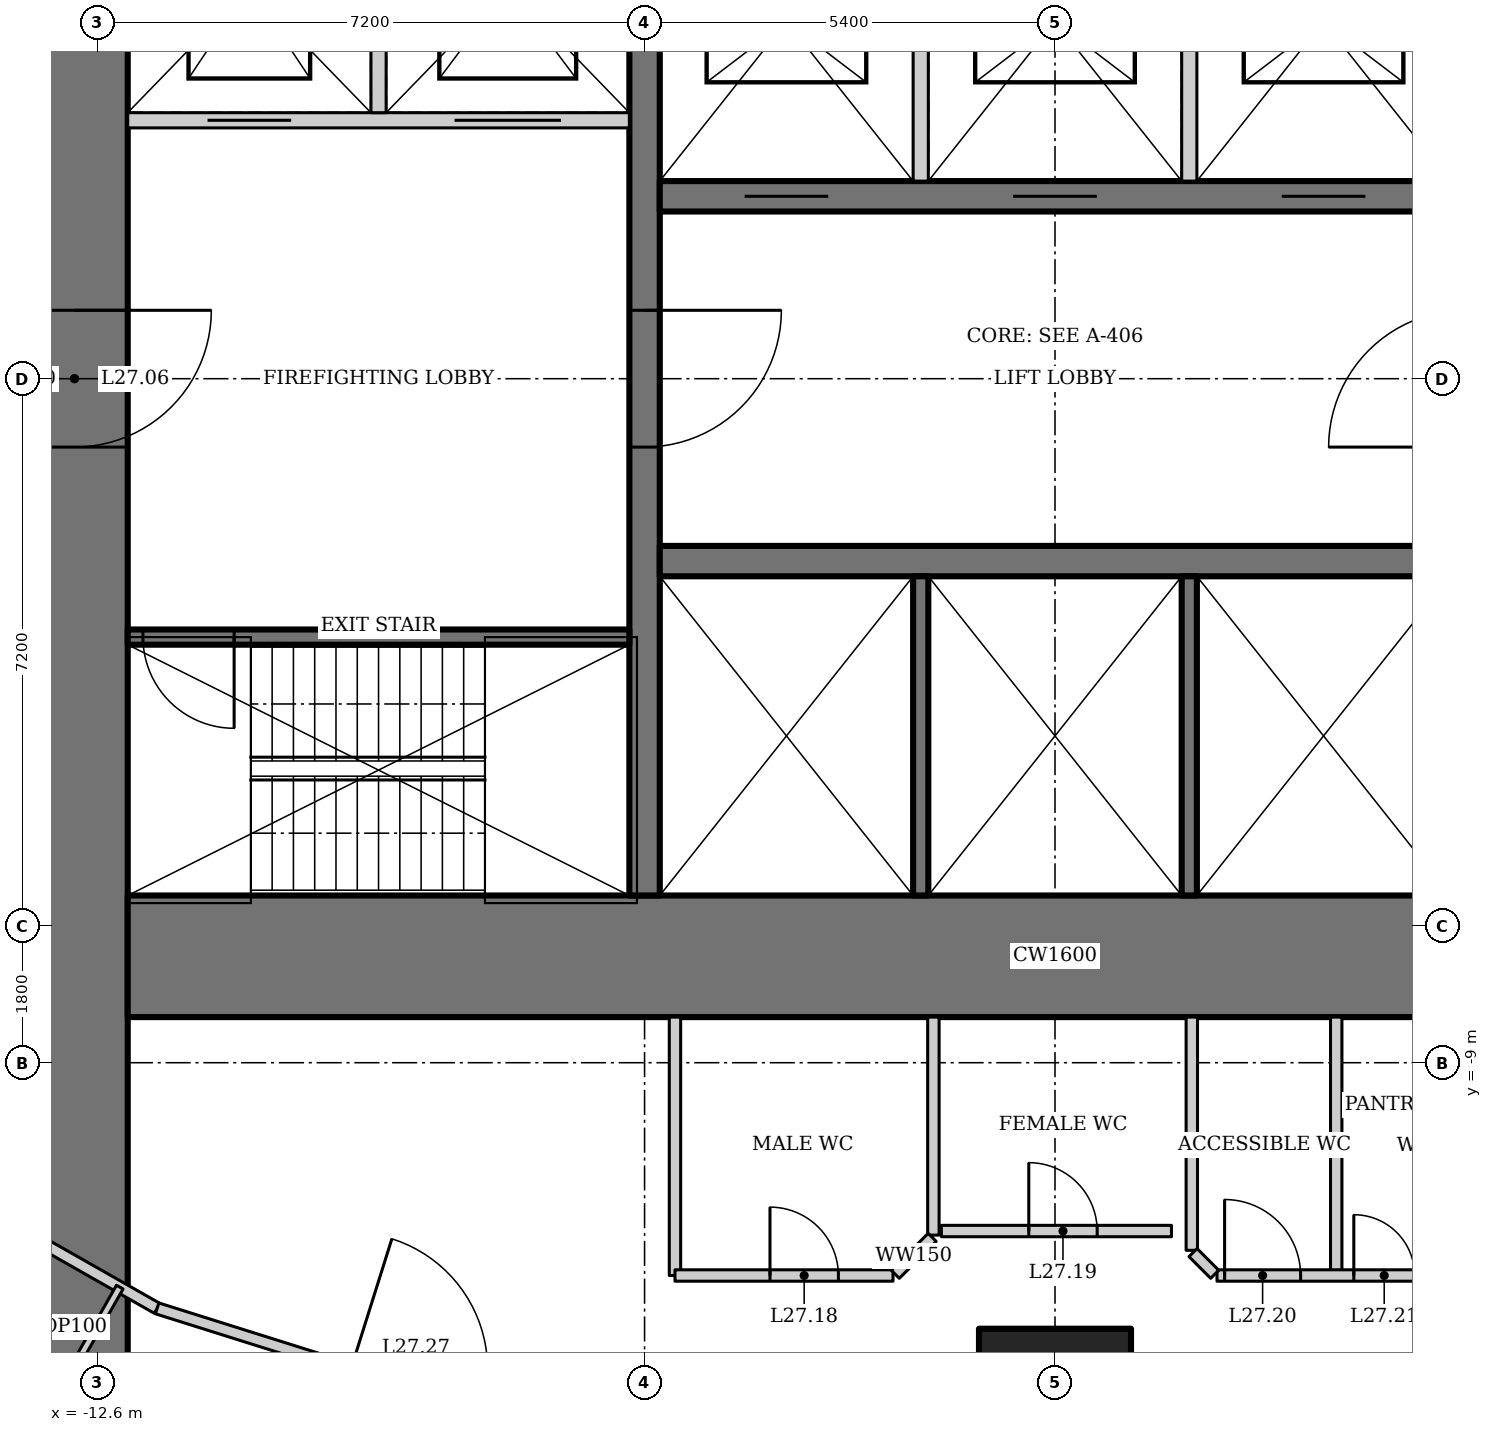
"""IFC4 building model, lengths in metres.
Left out: names, types, materials, properties, quantities, classifications, styles, units other than length and angle.
Written with IfcOpenShell. Run it as: python <this file> out.ifc"""

import sys

from ifc_helpers import new_model, si_unit, direction, frame, frame_2d, origin, origin_2d, place, context, subcontext, project, spatial, rectangle, hollow_rectangle, extrude, element, fill, save


model = new_model("IFC4")
c1 = context("Model", 3, precision=1e-05, world=origin(), true_north=direction((0.0, 1.0)))
c2 = subcontext(c1, "Body", "Model", "MODEL_VIEW")
j1 = project(units=[si_unit("LENGTHUNIT", "METRE"), si_unit("PLANEANGLEUNIT", "RADIAN")], contexts=[c1])
p1 = place(None, origin())
s1 = spatial("IfcSite", under=j1, at=p1, CompositionType="ELEMENT")
p2 = place(p1, origin())
s2 = spatial("IfcBuilding", under=s1, at=p2, CompositionType="ELEMENT")
p3 = place(p2, frame((0.0, 0.0, 117.4)))
s3 = spatial("IfcBuildingStorey", under=s2, at=p3, CompositionType="ELEMENT", Elevation=117.4)
p4 = place(p3, frame((0.0, -13.5, 0.0), z_axis=(0.0, 0.0, 1.0), x_axis=(1.0, 0.0, 0.0)))
e1 = element("IfcColumn", 1, at=p4, inside=s3, PredefinedType="COLUMN", context=c2, shape_type="SweptSolid", body=[
    extrude(hollow_rectangle(XDim=2.0, YDim=2.0, WallThickness=0.17, at=origin_2d()), origin(), (0.0, 0.0, 1.0), 4.2),
])
p5 = place(p3, frame((-12.9, 13.0, 0.0), z_axis=(0.0, 0.0, 1.0), x_axis=(0.0, -1.0, 0.0)))
e2 = element("IfcWall", 2, at=p5, inside=s3, PredefinedType="SHEAR", context=c2, shape_type="SweptSolid", body=[
    extrude(rectangle(XDim=26.0, YDim=1.4, at=frame_2d((13.0, 0.0))), origin(), (0.0, 0.0, 1.0), 4.2),
])
p6 = place(p5, frame((12.1, 0.0, 0.0)))
e3 = element("IfcOpeningElement", 3, at=p6, cuts=e2, PredefinedType="OPENING", context=c2, shape_type="SweptSolid", body=[
    extrude(rectangle(XDim=1.8, YDim=2.1, at=frame_2d((0.9, 1.05))), frame((0.0, 0.71, 0.0), z_axis=(0.0, -1.0, 0.0), x_axis=(1.0, 0.0, 0.0)), (0.0, 0.0, 1.0), 1.42),
])
p7 = place(p3, frame((-12.2, -7.6, 0.0), z_axis=(0.0, 0.0, 1.0), x_axis=(1.0, 0.0, 0.0)))
e4 = element("IfcWall", 4, at=p7, inside=s3, PredefinedType="SHEAR", context=c2, shape_type="SweptSolid", body=[
    extrude(rectangle(XDim=24.4, YDim=1.6, at=frame_2d((12.2, 0.0))), origin(), (0.0, 0.0, 1.0), 4.2),
])
p8 = place(p3, frame((-5.4, 6.8, 0.0), z_axis=(0.0, 0.0, 1.0), x_axis=(0.0, -1.0, 0.0)))
e5 = element("IfcWall", 5, at=p8, inside=s3, PredefinedType="SHEAR", context=c2, shape_type="SweptSolid", body=[
    extrude(rectangle(XDim=13.6, YDim=0.4, at=frame_2d((6.8, 0.0))), origin(), (0.0, 0.0, 1.0), 4.2),
])
p9 = place(p8, frame((5.9, 0.0, 0.0)))
e6 = element("IfcOpeningElement", 6, at=p9, cuts=e5, PredefinedType="OPENING", context=c2, shape_type="SweptSolid", body=[
    extrude(rectangle(XDim=1.8, YDim=2.1, at=frame_2d((0.9, 1.05))), frame((0.0, 0.21, 0.0), z_axis=(0.0, -1.0, 0.0), x_axis=(1.0, 0.0, 0.0)), (0.0, 0.0, 1.0), 0.42),
])
p10 = place(p3, frame((-5.2, -2.4, 0.0), z_axis=(0.0, 0.0, 1.0), x_axis=(1.0, 0.0, 0.0)))
e7 = element("IfcWall", 7, at=p10, inside=s3, PredefinedType="SHEAR", context=c2, shape_type="SweptSolid", body=[
    extrude(rectangle(XDim=10.4, YDim=0.4, at=frame_2d((5.2, 0.0))), origin(), (0.0, 0.0, 1.0), 4.2),
])
for number, where, z_axis, x_axis in (
    (8, (-1.767, -2.6, 0.0), (0.0, 0.0, 1.0), (0.0, -1.0, 0.0)),
    (9, (1.767, -2.6, 0.0), (0.0, 0.0, 1.0), (0.0, -1.0, 0.0)),
):
    element("IfcWall", number, at=place(p3, frame(where, z_axis=z_axis, x_axis=x_axis)), inside=s3, PredefinedType="SOLIDWALL", context=c2, shape_type="SweptSolid", body=[
        extrude(rectangle(XDim=4.2, YDim=0.2, at=frame_2d((2.1, 0.0))), origin(), (0.0, 0.0, 1.0), 4.2),
    ])
p11 = place(p3, frame((5.2, 2.4, 0.0), z_axis=(0.0, 0.0, 1.0), x_axis=(-1.0, 0.0, 0.0)))
e10 = element("IfcWall", 10, at=p11, inside=s3, PredefinedType="SHEAR", context=c2, shape_type="SweptSolid", body=[
    extrude(rectangle(XDim=10.4, YDim=0.4, at=frame_2d((5.2, 0.0))), origin(), (0.0, 0.0, 1.0), 4.2),
])
p12 = place(p11, frame((8.183, 0.0, 0.0)))
e11 = element("IfcOpeningElement", 11, at=p12, cuts=e10, PredefinedType="OPENING", context=c2, shape_type="SweptSolid", body=[
    extrude(rectangle(XDim=1.1, YDim=2.2, at=frame_2d((0.55, 1.1))), frame((0.0, 0.21, 0.0), z_axis=(0.0, -1.0, 0.0), x_axis=(1.0, 0.0, 0.0)), (0.0, 0.0, 1.0), 0.42),
])
p13 = place(p11, frame((4.65, 0.0, 0.0)))
e12 = element("IfcOpeningElement", 12, at=p13, cuts=e10, PredefinedType="OPENING", context=c2, shape_type="SweptSolid", body=[
    extrude(rectangle(XDim=1.1, YDim=2.2, at=frame_2d((0.55, 1.1))), frame((0.0, 0.21, 0.0), z_axis=(0.0, -1.0, 0.0), x_axis=(1.0, 0.0, 0.0)), (0.0, 0.0, 1.0), 0.42),
])
p14 = place(p11, frame((1.117, 0.0, 0.0)))
e13 = element("IfcOpeningElement", 13, at=p14, cuts=e10, PredefinedType="OPENING", context=c2, shape_type="SweptSolid", body=[
    extrude(rectangle(XDim=1.1, YDim=2.2, at=frame_2d((0.55, 1.1))), frame((0.0, 0.21, 0.0), z_axis=(0.0, -1.0, 0.0), x_axis=(1.0, 0.0, 0.0)), (0.0, 0.0, 1.0), 0.42),
])
for number, where, z_axis, x_axis in (
    (14, (-1.767, 2.6, 0.0), (0.0, 0.0, 1.0), (0.0, 1.0, 0.0)),
    (15, (1.767, 2.6, 0.0), (0.0, 0.0, 1.0), (0.0, 1.0, 0.0)),
):
    element("IfcWall", number, at=place(p3, frame(where, z_axis=z_axis, x_axis=x_axis)), inside=s3, PredefinedType="SOLIDWALL", context=c2, shape_type="SweptSolid", body=[
        extrude(rectangle(XDim=4.2, YDim=0.2, at=frame_2d((2.1, 0.0))), origin(), (0.0, 0.0, 1.0), 4.2),
    ])
p15 = place(p3, frame((-5.6, -3.4, 0.0), z_axis=(0.0, 0.0, 1.0), x_axis=(-1.0, 0.0, 0.0)))
e16 = element("IfcWall", 16, at=p15, inside=s3, PredefinedType="SHEAR", context=c2, shape_type="SweptSolid", body=[
    extrude(rectangle(XDim=6.6, YDim=0.2, at=frame_2d((3.3, 0.0))), origin(), (0.0, 0.0, 1.0), 4.2),
])
p16 = place(p15, frame((5.2, 0.0, 0.0)))
e17 = element("IfcOpeningElement", 17, at=p16, cuts=e16, PredefinedType="OPENING", context=c2, shape_type="SweptSolid", body=[
    extrude(rectangle(XDim=1.2, YDim=2.1, at=frame_2d((0.6, 1.05))), frame((0.0, 0.11, 0.0), z_axis=(0.0, -1.0, 0.0), x_axis=(1.0, 0.0, 0.0)), (0.0, 0.0, 1.0), 0.22),
])
p17 = place(p3, frame((-12.2, 3.4, 0.0), z_axis=(0.0, 0.0, 1.0), x_axis=(1.0, 0.0, 0.0)))
e18 = element("IfcWall", 18, at=p17, inside=s3, PredefinedType="SOLIDWALL", context=c2, shape_type="SweptSolid", body=[
    extrude(rectangle(XDim=6.6, YDim=0.2, at=frame_2d((3.3, 0.0))), origin(), (0.0, 0.0, 1.0), 4.2),
])
p18 = place(p17, frame((1.05, 0.0, 0.0)))
e19 = element("IfcOpeningElement", 19, at=p18, cuts=e18, PredefinedType="OPENING", context=c2, shape_type="SweptSolid", body=[
    extrude(rectangle(XDim=1.1, YDim=2.2, at=frame_2d((0.55, 1.1))), frame((0.0, 0.11, 0.0), z_axis=(0.0, -1.0, 0.0), x_axis=(1.0, 0.0, 0.0)), (0.0, 0.0, 1.0), 0.22),
])
p19 = place(p17, frame((4.3, 0.0, 0.0)))
e20 = element("IfcOpeningElement", 20, at=p19, cuts=e18, PredefinedType="OPENING", context=c2, shape_type="SweptSolid", body=[
    extrude(rectangle(XDim=1.4, YDim=2.2, at=frame_2d((0.7, 1.1))), frame((0.0, 0.11, 0.0), z_axis=(0.0, -1.0, 0.0), x_axis=(1.0, 0.0, 0.0)), (0.0, 0.0, 1.0), 0.22),
])
p20 = place(p3, frame((-8.9, 3.5, 0.0), z_axis=(0.0, 0.0, 1.0), x_axis=(0.0, 1.0, 0.0)))
e21 = element("IfcWall", 21, at=p20, inside=s3, PredefinedType="SOLIDWALL", context=c2, shape_type="SweptSolid", body=[
    extrude(rectangle(XDim=3.3, YDim=0.2, at=frame_2d((1.65, 0.0))), origin(), (0.0, 0.0, 1.0), 4.2),
])
p21 = place(p3, frame((-16.623, -9.499, 0.0), z_axis=(0.0, 0.0, 1.0), x_axis=(0.869375991036, -0.494151177485, 0.0)))
e22 = element("IfcWall", 22, at=p21, inside=s3, PredefinedType="PARTITIONING", context=c2, shape_type="SweptSolid", body=[
    extrude(rectangle(XDim=5.532, YDim=0.15, at=frame_2d((2.766, 0.0))), origin(), (0.0, 0.0, 1.0), 4.05),
])
p22 = place(p3, frame((-11.813, -12.232, 0.0), z_axis=(0.0, 0.0, 1.0), x_axis=(0.953893934057, -0.300143903101, 0.0)))
e23 = element("IfcWall", 23, at=p22, inside=s3, PredefinedType="PARTITIONING", context=c2, shape_type="SweptSolid", body=[
    extrude(rectangle(XDim=5.042, YDim=0.15, at=frame_2d((2.521, 0.0))), origin(), (0.0, 0.0, 1.0), 4.05),
])
p23 = place(p22, frame((2.671, 0.0, 0.0)))
e24 = element("IfcOpeningElement", 24, at=p23, cuts=e23, PredefinedType="OPENING", context=c2, shape_type="SweptSolid", body=[
    extrude(rectangle(XDim=1.8, YDim=2.1, at=frame_2d((0.9, 1.05))), frame((0.0, 0.085, 0.0), z_axis=(0.0, -1.0, 0.0), x_axis=(1.0, 0.0, 0.0)), (0.0, 0.0, 1.0), 0.17),
])
for number, where, z_axis, x_axis in (
    (25, (-5.0, -8.4, 0.0), (0.0, 0.0, 1.0), (0.0, -1.0, 0.0)),
    (26, (3.7, -8.4, 0.0), (0.0, 0.0, 1.0), (0.0, -1.0, 0.0)),
):
    element("IfcWall", number, at=place(p3, frame(where, z_axis=z_axis, x_axis=x_axis)), inside=s3, PredefinedType="SOLIDWALL", context=c2, shape_type="SweptSolid", body=[
        extrude(rectangle(XDim=3.4, YDim=0.15, at=frame_2d((1.7, 0.0))), origin(), (0.0, 0.0, 1.0), 4.05),
    ])
p24 = place(p3, frame((-12.9, -13.0, 0.0), z_axis=(0.0, 0.0, 1.0), x_axis=(0.494173075358, 0.869363543974, 0.0)))
e27 = element("IfcWall", 27, at=p24, inside=s3, PredefinedType="PARTITIONING", context=c2, shape_type="SweptSolid", body=[
    extrude(rectangle(XDim=1.204, YDim=0.1, at=frame_2d((0.602, 0.0))), origin(), (0.0, 0.0, 1.0), 4.05),
])
p25 = place(p3, frame((-5.0, -11.8, 0.0), z_axis=(0.0, 0.0, 1.0), x_axis=(1.0, 0.0, 0.0)))
e28 = element("IfcWall", 28, at=p25, inside=s3, PredefinedType="SOLIDWALL", context=c2, shape_type="SweptSolid", body=[
    extrude(rectangle(XDim=2.869, YDim=0.15, at=frame_2d((1.434, 0.0))), origin(), (0.0, 0.0, 1.0), 4.05),
])
p26 = place(p25, frame((1.25, 0.0, 0.0)))
e29 = element("IfcOpeningElement", 29, at=p26, cuts=e28, PredefinedType="OPENING", context=c2, shape_type="SweptSolid", body=[
    extrude(rectangle(XDim=0.9, YDim=2.1, at=frame_2d((0.45, 1.05))), frame((0.0, 0.085, 0.0), z_axis=(0.0, -1.0, 0.0), x_axis=(1.0, 0.0, 0.0)), (0.0, 0.0, 1.0), 0.17),
])
p27 = place(p3, frame((2.131, -11.8, 0.0), z_axis=(0.0, 0.0, 1.0), x_axis=(1.0, 0.0, 0.0)))
e30 = element("IfcWall", 30, at=p27, inside=s3, PredefinedType="SOLIDWALL", context=c2, shape_type="SweptSolid", body=[
    extrude(rectangle(XDim=2.869, YDim=0.15, at=frame_2d((1.434, 0.0))), origin(), (0.0, 0.0, 1.0), 4.05),
])
p28 = place(p27, frame((0.1, 0.0, 0.0)))
e31 = element("IfcOpeningElement", 31, at=p28, cuts=e30, PredefinedType="OPENING", context=c2, shape_type="SweptSolid", body=[
    extrude(rectangle(XDim=1.0, YDim=2.1, at=frame_2d((0.5, 1.05))), frame((0.0, 0.085, 0.0), z_axis=(0.0, -1.0, 0.0), x_axis=(1.0, 0.0, 0.0)), (0.0, 0.0, 1.0), 0.17),
])
p29 = place(p27, frame((1.8, 0.0, 0.0)))
e32 = element("IfcOpeningElement", 32, at=p29, cuts=e30, PredefinedType="OPENING", context=c2, shape_type="SweptSolid", body=[
    extrude(rectangle(XDim=0.8, YDim=2.1, at=frame_2d((0.4, 1.05))), frame((0.0, 0.085, 0.0), z_axis=(0.0, -1.0, 0.0), x_axis=(1.0, 0.0, 0.0)), (0.0, 0.0, 1.0), 0.17),
])
p30 = place(p3, frame((-1.6, -8.4, 0.0), z_axis=(0.0, 0.0, 1.0), x_axis=(0.0, -1.0, 0.0)))
e33 = element("IfcWall", 33, at=p30, inside=s3, PredefinedType="SOLIDWALL", context=c2, shape_type="SweptSolid", body=[
    extrude(rectangle(XDim=2.869, YDim=0.15, at=frame_2d((1.434, 0.0))), origin(), (0.0, 0.0, 1.0), 4.05),
])
p31 = place(p3, frame((1.8, -8.4, 0.0), z_axis=(0.0, 0.0, 1.0), x_axis=(0.0, -1.0, 0.0)))
e34 = element("IfcWall", 34, at=p31, inside=s3, PredefinedType="SOLIDWALL", context=c2, shape_type="SweptSolid", body=[
    extrude(rectangle(XDim=3.069, YDim=0.15, at=frame_2d((1.534, 0.0))), origin(), (0.0, 0.0, 1.0), 4.05),
])
p32 = place(p3, frame((-2.101, -11.784, 0.0), z_axis=(0.0, 0.0, 1.0), x_axis=(0.706928959799, 0.707284557867, 0.0)))
e35 = element("IfcWall", 35, at=p32, inside=s3, PredefinedType="SOLIDWALL", context=c2, shape_type="SweptSolid", body=[
    extrude(rectangle(XDim=0.687, YDim=0.15, at=frame_2d((0.343, 0.0))), origin(), (0.0, 0.0, 1.0), 4.05),
])
p33 = place(p3, frame((-1.495, -11.215, 0.0), z_axis=(0.0, 0.0, 1.0), x_axis=(1.0, 0.0, 0.0)))
e36 = element("IfcWall", 36, at=p33, inside=s3, PredefinedType="SOLIDWALL", context=c2, shape_type="SweptSolid", body=[
    extrude(rectangle(XDim=3.027, YDim=0.15, at=frame_2d((1.514, 0.0))), origin(), (0.0, 0.0, 1.0), 4.05),
])
p34 = place(p33, frame((1.15, 0.0, 0.0)))
e37 = element("IfcOpeningElement", 37, at=p34, cuts=e36, PredefinedType="OPENING", context=c2, shape_type="SweptSolid", body=[
    extrude(rectangle(XDim=0.9, YDim=2.1, at=frame_2d((0.45, 1.05))), frame((0.0, 0.085, 0.0), z_axis=(0.0, -1.0, 0.0), x_axis=(1.0, 0.0, 0.0)), (0.0, 0.0, 1.0), 0.17),
])
p35 = place(p3, frame((1.816, -11.499, 0.0), z_axis=(0.0, 0.0, 1.0), x_axis=(0.706804405012, -0.707409028113, 0.0)))
e38 = element("IfcWall", 38, at=p35, inside=s3, PredefinedType="SOLIDWALL", context=c2, shape_type="SweptSolid", body=[
    extrude(rectangle(XDim=0.404, YDim=0.15, at=frame_2d((0.202, 0.0))), origin(), (0.0, 0.0, 1.0), 4.05),
])
p36 = place(p9, origin())
e39 = element("IfcDoor", 39, at=p36, inside=s3, OperationType="DOUBLE_DOOR_DOUBLE_SWING", PredefinedType="DOOR", context=c2, shape_type="SweptSolid", body=[
    extrude(rectangle(XDim=1.8, YDim=2.1, at=frame_2d((0.9, 1.05))), frame((0.0, 0.025, 0.0), z_axis=(0.0, -1.0, 0.0), x_axis=(1.0, 0.0, 0.0)), (0.0, 0.0, 1.0), 0.05),
])
fill(e6, e39)
p37 = place(p16, origin())
e40 = element("IfcDoor", 40, at=p37, inside=s3, OperationType="SINGLE_SWING_RIGHT", PredefinedType="DOOR", context=c2, shape_type="SweptSolid", body=[
    extrude(rectangle(XDim=1.2, YDim=2.1, at=frame_2d((0.6, 1.05))), frame((0.0, 0.025, 0.0), z_axis=(0.0, -1.0, 0.0), x_axis=(1.0, 0.0, 0.0)), (0.0, 0.0, 1.0), 0.05),
])
fill(e17, e40)
p38 = place(p6, origin())
e41 = element("IfcDoor", 41, at=p38, inside=s3, OperationType="DOUBLE_DOOR_DOUBLE_SWING", PredefinedType="DOOR", context=c2, shape_type="SweptSolid", body=[
    extrude(rectangle(XDim=1.8, YDim=2.1, at=frame_2d((0.9, 1.05))), frame((0.0, 0.025, 0.0), z_axis=(0.0, -1.0, 0.0), x_axis=(1.0, 0.0, 0.0)), (0.0, 0.0, 1.0), 0.05),
])
fill(e3, e41)
p39 = place(p12, origin())
e42 = element("IfcDoor", 42, at=p39, inside=s3, OperationType="DOUBLE_DOOR_SLIDING", PredefinedType="DOOR", context=c2, shape_type="SweptSolid", body=[
    extrude(rectangle(XDim=1.1, YDim=2.2, at=frame_2d((0.55, 1.1))), frame((0.0, 0.025, 0.0), z_axis=(0.0, -1.0, 0.0), x_axis=(1.0, 0.0, 0.0)), (0.0, 0.0, 1.0), 0.05),
])
fill(e11, e42)
p40 = place(p13, origin())
e43 = element("IfcDoor", 43, at=p40, inside=s3, OperationType="DOUBLE_DOOR_SLIDING", PredefinedType="DOOR", context=c2, shape_type="SweptSolid", body=[
    extrude(rectangle(XDim=1.1, YDim=2.2, at=frame_2d((0.55, 1.1))), frame((0.0, 0.025, 0.0), z_axis=(0.0, -1.0, 0.0), x_axis=(1.0, 0.0, 0.0)), (0.0, 0.0, 1.0), 0.05),
])
fill(e12, e43)
p41 = place(p14, origin())
e44 = element("IfcDoor", 44, at=p41, inside=s3, OperationType="DOUBLE_DOOR_SLIDING", PredefinedType="DOOR", context=c2, shape_type="SweptSolid", body=[
    extrude(rectangle(XDim=1.1, YDim=2.2, at=frame_2d((0.55, 1.1))), frame((0.0, 0.025, 0.0), z_axis=(0.0, -1.0, 0.0), x_axis=(1.0, 0.0, 0.0)), (0.0, 0.0, 1.0), 0.05),
])
fill(e13, e44)
p42 = place(p18, origin())
e45 = element("IfcDoor", 45, at=p42, inside=s3, OperationType="DOUBLE_DOOR_SLIDING", PredefinedType="DOOR", context=c2, shape_type="SweptSolid", body=[
    extrude(rectangle(XDim=1.1, YDim=2.2, at=frame_2d((0.55, 1.1))), frame((0.0, 0.025, 0.0), z_axis=(0.0, -1.0, 0.0), x_axis=(1.0, 0.0, 0.0)), (0.0, 0.0, 1.0), 0.05),
])
fill(e19, e45)
p43 = place(p19, origin())
e46 = element("IfcDoor", 46, at=p43, inside=s3, OperationType="DOUBLE_DOOR_SLIDING", PredefinedType="DOOR", context=c2, shape_type="SweptSolid", body=[
    extrude(rectangle(XDim=1.4, YDim=2.2, at=frame_2d((0.7, 1.1))), frame((0.0, 0.025, 0.0), z_axis=(0.0, -1.0, 0.0), x_axis=(1.0, 0.0, 0.0)), (0.0, 0.0, 1.0), 0.05),
])
fill(e20, e46)
p44 = place(p26, origin())
e47 = element("IfcDoor", 47, at=p44, inside=s3, OperationType="SINGLE_SWING_LEFT", PredefinedType="DOOR", context=c2, shape_type="SweptSolid", body=[
    extrude(rectangle(XDim=0.9, YDim=2.1, at=frame_2d((0.45, 1.05))), frame((0.0, 0.025, 0.0), z_axis=(0.0, -1.0, 0.0), x_axis=(1.0, 0.0, 0.0)), (0.0, 0.0, 1.0), 0.05),
])
fill(e29, e47)
p45 = place(p34, origin())
e48 = element("IfcDoor", 48, at=p45, inside=s3, OperationType="SINGLE_SWING_LEFT", PredefinedType="DOOR", context=c2, shape_type="SweptSolid", body=[
    extrude(rectangle(XDim=0.9, YDim=2.1, at=frame_2d((0.45, 1.05))), frame((0.0, 0.025, 0.0), z_axis=(0.0, -1.0, 0.0), x_axis=(1.0, 0.0, 0.0)), (0.0, 0.0, 1.0), 0.05),
])
fill(e37, e48)
p46 = place(p28, origin())
e49 = element("IfcDoor", 49, at=p46, inside=s3, OperationType="SINGLE_SWING_LEFT", PredefinedType="DOOR", context=c2, shape_type="SweptSolid", body=[
    extrude(rectangle(XDim=1.0, YDim=2.1, at=frame_2d((0.5, 1.05))), frame((0.0, 0.025, 0.0), z_axis=(0.0, -1.0, 0.0), x_axis=(1.0, 0.0, 0.0)), (0.0, 0.0, 1.0), 0.05),
])
fill(e31, e49)
p47 = place(p29, origin())
e50 = element("IfcDoor", 50, at=p47, inside=s3, OperationType="SINGLE_SWING_LEFT", PredefinedType="DOOR", context=c2, shape_type="SweptSolid", body=[
    extrude(rectangle(XDim=0.8, YDim=2.1, at=frame_2d((0.4, 1.05))), frame((0.0, 0.025, 0.0), z_axis=(0.0, -1.0, 0.0), x_axis=(1.0, 0.0, 0.0)), (0.0, 0.0, 1.0), 0.05),
])
fill(e32, e50)
save(model, sys.argv[1])
